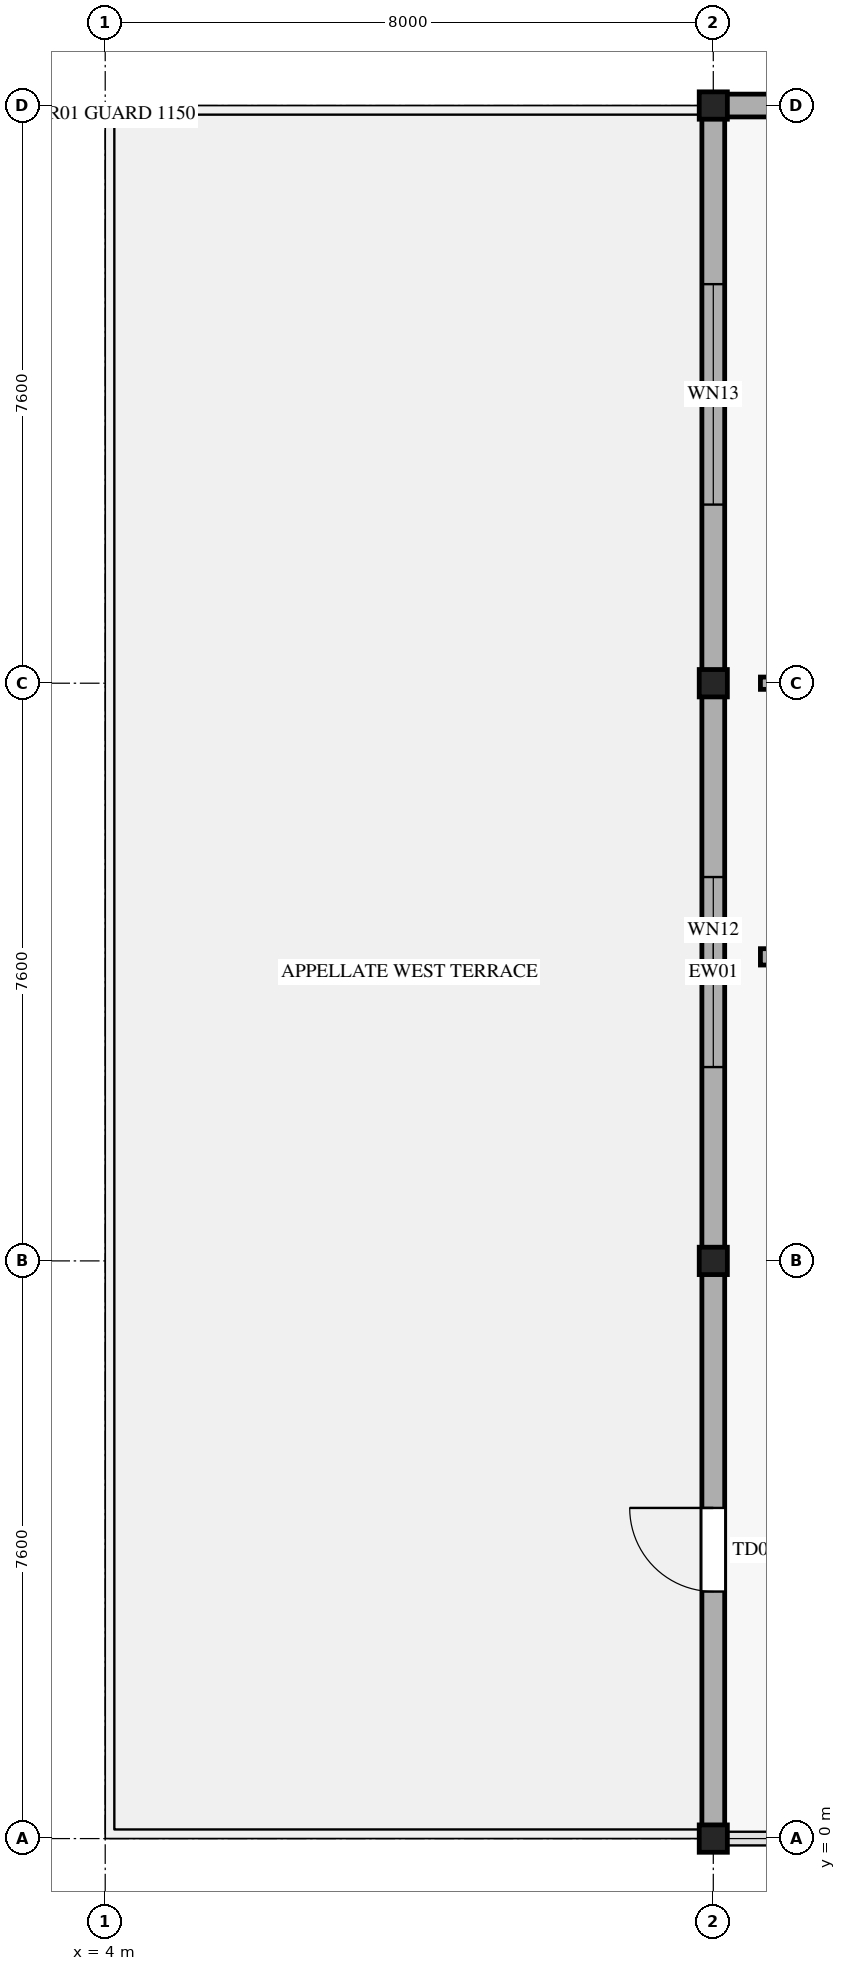
"""IFC4 building model, lengths in metres.
Left out: names, types, materials, properties, quantities, classifications, styles, units other than length and angle.
Written with IfcOpenShell. Run it as: python <this file> out.ifc"""

import sys

from ifc_helpers import new_model, si_unit, direction, frame, frame_2d, origin, origin_2d, place, context, subcontext, project, spatial, rectangle, i_section, extrude, element, fill, save


model = new_model("IFC4")
c1 = context("Model", 3, precision=1e-05, world=origin(), true_north=direction((0.0, 1.0)))
c2 = subcontext(c1, "Body", "Model", "MODEL_VIEW")
j1 = project(units=[si_unit("LENGTHUNIT", "METRE"), si_unit("PLANEANGLEUNIT", "RADIAN")], contexts=[c1])
p1 = place(None, origin())
s1 = spatial("IfcSite", under=j1, at=p1, CompositionType="ELEMENT")
p2 = place(p1, origin())
s2 = spatial("IfcBuilding", under=s1, at=p2, CompositionType="ELEMENT")
p3 = place(p2, frame((0.0, 0.0, 29.4)))
s3 = spatial("IfcBuildingStorey", under=s2, at=p3, CompositionType="ELEMENT", Elevation=29.4)
for number, where, z_axis, x_axis in (
    (1, (12.0, 0.0, 0.0), (0.0, 0.0, 1.0), (1.0, 0.0, 0.0)),
    (2, (12.0, 7.6, 0.0), (0.0, 0.0, 1.0), (1.0, 0.0, 0.0)),
    (3, (12.0, 15.2, 0.0), (0.0, 0.0, 1.0), (1.0, 0.0, 0.0)),
    (4, (12.0, 22.8, 0.0), (0.0, 0.0, 1.0), (1.0, 0.0, 0.0)),
):
    element("IfcColumn", number, at=place(p3, frame(where, z_axis=z_axis, x_axis=x_axis)), inside=s3, PredefinedType="COLUMN", context=c2, shape_type="SweptSolid", body=[
        extrude(i_section(OverallWidth=0.37, OverallDepth=0.36, WebThickness=0.012, FlangeThickness=0.02, FilletRadius=0.015, at=origin_2d()), origin(), (0.0, 0.0, 1.0), 4.0),
    ])
p4 = place(p3, frame((12.0, -0.02, 0.0), z_axis=(0.0, 0.0, 1.0), x_axis=(0.0, 1.0, 0.0)))
e5 = element("IfcWall", 5, at=p4, inside=s3, PredefinedType="STANDARD", context=c2, shape_type="SweptSolid", body=[
    extrude(rectangle(XDim=7.64, YDim=0.3, at=frame_2d((3.82, 0.0))), origin(), (0.0, 0.0, 1.0), 3.06),
])
p5 = place(p4, frame((3.27, 0.0, 0.0)))
e6 = element("IfcOpeningElement", 6, at=p5, cuts=e5, PredefinedType="OPENING", context=c2, shape_type="SweptSolid", body=[
    extrude(rectangle(XDim=1.1, YDim=2.2, at=frame_2d((0.55, 1.1))), frame((0.0, 0.16, 0.0), z_axis=(0.0, -1.0, 0.0), x_axis=(1.0, 0.0, 0.0)), (0.0, 0.0, 1.0), 0.32),
])
p6 = place(p3, frame((12.0, 7.58, 0.0), z_axis=(0.0, 0.0, 1.0), x_axis=(0.0, 1.0, 0.0)))
e7 = element("IfcWall", 7, at=p6, inside=s3, PredefinedType="STANDARD", context=c2, shape_type="SweptSolid", body=[
    extrude(rectangle(XDim=7.64, YDim=0.3, at=frame_2d((3.82, 0.0))), origin(), (0.0, 0.0, 1.0), 3.06),
])
p7 = place(p6, frame((2.57, 0.0, 0.75)))
e8 = element("IfcOpeningElement", 8, at=p7, cuts=e7, PredefinedType="OPENING", context=c2, shape_type="SweptSolid", body=[
    extrude(rectangle(XDim=2.5, YDim=2.15, at=frame_2d((1.25, 1.075))), frame((0.0, 0.16, 0.0), z_axis=(0.0, -1.0, 0.0), x_axis=(1.0, 0.0, 0.0)), (0.0, 0.0, 1.0), 0.32),
])
p8 = place(p3, frame((12.0, 15.18, 0.0), z_axis=(0.0, 0.0, 1.0), x_axis=(0.0, 1.0, 0.0)))
e9 = element("IfcWall", 9, at=p8, inside=s3, PredefinedType="STANDARD", context=c2, shape_type="SweptSolid", body=[
    extrude(rectangle(XDim=7.64, YDim=0.3, at=frame_2d((3.82, 0.0))), origin(), (0.0, 0.0, 1.0), 3.06),
])
p9 = place(p8, frame((2.37, 0.0, 0.75)))
e10 = element("IfcOpeningElement", 10, at=p9, cuts=e9, PredefinedType="OPENING", context=c2, shape_type="SweptSolid", body=[
    extrude(rectangle(XDim=2.9, YDim=2.15, at=frame_2d((1.45, 1.075))), frame((0.0, 0.16, 0.0), z_axis=(0.0, -1.0, 0.0), x_axis=(1.0, 0.0, 0.0)), (0.0, 0.0, 1.0), 0.32),
])
p10 = place(p3, frame((11.98, 22.8, 0.0), z_axis=(0.0, 0.0, 1.0), x_axis=(1.0, 0.0, 0.0)))
e11 = element("IfcWall", 11, at=p10, inside=s3, PredefinedType="STANDARD", context=c2, shape_type="SweptSolid", body=[
    extrude(rectangle(XDim=8.04, YDim=0.3, at=frame_2d((4.02, 0.0))), origin(), (0.0, 0.0, 1.0), 3.06),
])
p11 = place(p3, frame((12.62, 11.6, 0.0), z_axis=(0.0, 0.0, 1.0), x_axis=(1.0, 0.0, 0.0)))
e12 = element("IfcWall", 12, at=p11, inside=s3, PredefinedType="PARTITIONING", context=c2, shape_type="SweptSolid", body=[
    extrude(rectangle(XDim=17.16, YDim=0.215, at=frame_2d((8.58, 0.0))), origin(), (0.0, 0.0, 1.0), 2.85),
])
p12 = place(p11, frame((7.88, 0.0, 0.0)))
e13 = element("IfcOpeningElement", 13, at=p12, cuts=e12, PredefinedType="OPENING", context=c2, shape_type="SweptSolid", body=[
    extrude(rectangle(XDim=1.4, YDim=2.3, at=frame_2d((0.7, 1.15))), frame((0.0, 0.117, 0.0), z_axis=(0.0, -1.0, 0.0), x_axis=(1.0, 0.0, 0.0)), (0.0, 0.0, 1.0), 0.235),
])
p13 = place(p3, frame((12.62, 15.2, 0.0), z_axis=(0.0, 0.0, 1.0), x_axis=(1.0, 0.0, 0.0)))
e14 = element("IfcWall", 14, at=p13, inside=s3, PredefinedType="PARTITIONING", context=c2, shape_type="SweptSolid", body=[
    extrude(rectangle(XDim=4.96, YDim=0.162, at=frame_2d((2.48, 0.0))), origin(), (0.0, 0.0, 1.0), 2.85),
])
p14 = place(p13, frame((1.455, 0.0, 0.0)))
e15 = element("IfcOpeningElement", 15, at=p14, cuts=e14, PredefinedType="OPENING", context=c2, shape_type="SweptSolid", body=[
    extrude(rectangle(XDim=2.05, YDim=2.45, at=frame_2d((1.025, 1.225))), frame((0.0, 0.091, 0.0), z_axis=(0.0, -1.0, 0.0), x_axis=(1.0, 0.0, 0.0)), (0.0, 0.0, 1.0), 0.182),
])
p15 = place(p5, origin())
e16 = element("IfcDoor", 16, at=p15, inside=s3, OperationType="SINGLE_SWING_RIGHT", PredefinedType="DOOR", context=c2, shape_type="SweptSolid", body=[
    extrude(rectangle(XDim=1.1, YDim=2.2, at=frame_2d((0.55, 1.1))), frame((0.0, 0.025, 0.0), z_axis=(0.0, -1.0, 0.0), x_axis=(1.0, 0.0, 0.0)), (0.0, 0.0, 1.0), 0.05),
])
fill(e6, e16)
p16 = place(p7, origin())
e17 = element("IfcWindow", 17, at=p16, inside=s3, PartitioningType="SINGLE_PANEL", PredefinedType="WINDOW", context=c2, shape_type="SweptSolid", body=[
    extrude(rectangle(XDim=2.5, YDim=2.15, at=frame_2d((1.25, 1.075))), frame((0.0, 0.03, 0.0), z_axis=(0.0, -1.0, 0.0), x_axis=(1.0, 0.0, 0.0)), (0.0, 0.0, 1.0), 0.06),
])
fill(e8, e17)
p17 = place(p9, origin())
e18 = element("IfcWindow", 18, at=p17, inside=s3, PartitioningType="SINGLE_PANEL", PredefinedType="WINDOW", context=c2, shape_type="SweptSolid", body=[
    extrude(rectangle(XDim=2.9, YDim=2.15, at=frame_2d((1.45, 1.075))), frame((0.0, 0.03, 0.0), z_axis=(0.0, -1.0, 0.0), x_axis=(1.0, 0.0, 0.0)), (0.0, 0.0, 1.0), 0.06),
])
fill(e10, e18)
save(model, sys.argv[1])
